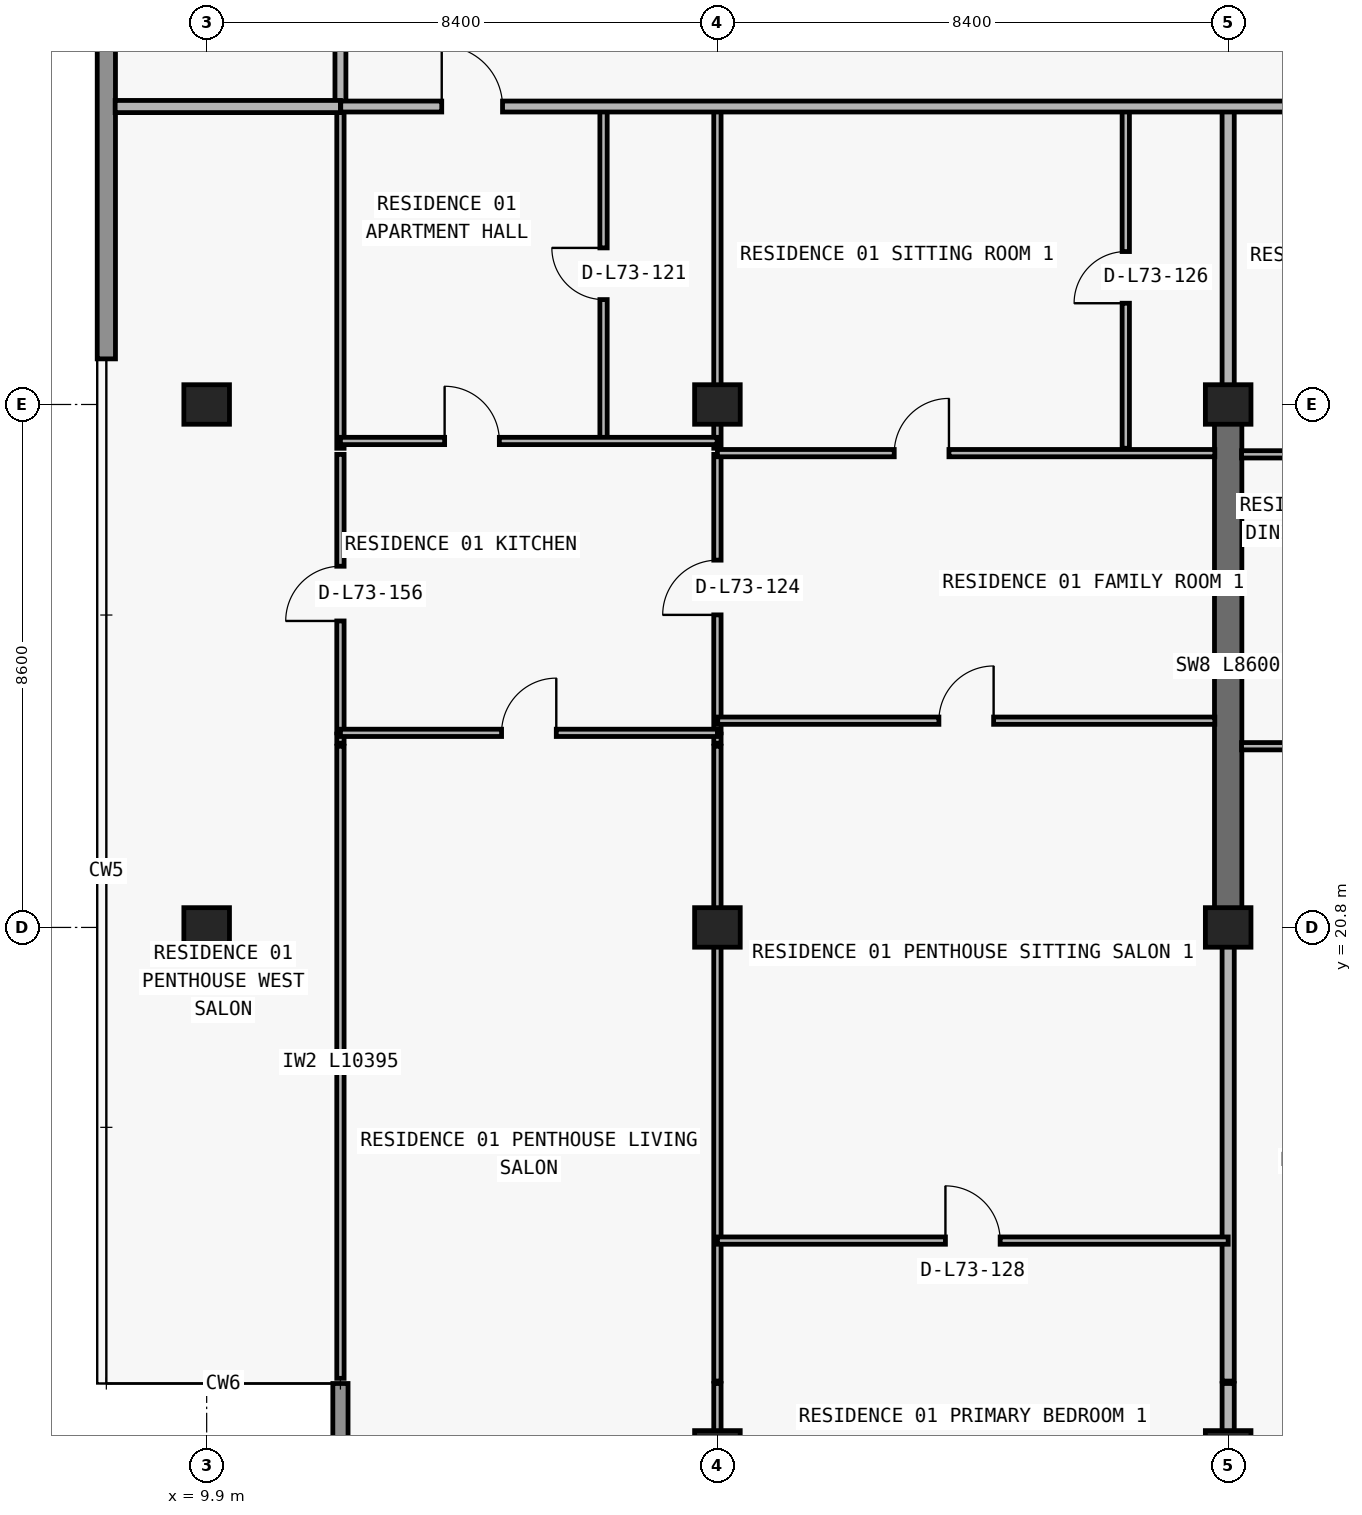
"""IFC4 building model, lengths in metres.
Left out: names, types, materials, properties, quantities, classifications, styles, units other than length and angle.
Written with IfcOpenShell. Run it as: python <this file> out.ifc"""

import sys

from ifc_helpers import new_model, si_unit, direction, frame, frame_2d, origin, origin_2d, place, context, subcontext, project, spatial, rectangle, extrude, element, fill, save


model = new_model("IFC4")
c1 = context("Model", 3, precision=1e-05, world=origin(), true_north=direction((0.0, 1.0)))
c2 = subcontext(c1, "Body", "Model", "MODEL_VIEW")
j1 = project(units=[si_unit("LENGTHUNIT", "METRE"), si_unit("PLANEANGLEUNIT", "RADIAN")], contexts=[c1])
p1 = place(None, origin())
s1 = spatial("IfcSite", under=j1, at=p1, CompositionType="ELEMENT")
p2 = place(p1, origin())
s2 = spatial("IfcBuilding", under=s1, at=p2, CompositionType="ELEMENT")
p3 = place(p2, frame((0.0, 0.0, 259.5)))
s3 = spatial("IfcBuildingStorey", under=s2, at=p3, CompositionType="ELEMENT", Elevation=259.5)
for number, where, z_axis, x_axis in (
    (1, (18.3, 12.2, 0.0), (0.0, 0.0, 1.0), (1.0, 0.0, 0.0)),
    (2, (26.7, 12.2, 0.0), (0.0, 0.0, 1.0), (1.0, 0.0, 0.0)),
    (3, (9.9, 20.8, 0.0), (0.0, 0.0, 1.0), (1.0, 0.0, 0.0)),
    (4, (18.3, 20.8, 0.0), (0.0, 0.0, 1.0), (1.0, 0.0, 0.0)),
    (5, (26.7, 20.8, 0.0), (0.0, 0.0, 1.0), (1.0, 0.0, 0.0)),
    (6, (9.9, 29.4, 0.0), (0.0, 0.0, 1.0), (1.0, 0.0, 0.0)),
    (7, (18.3, 29.4, 0.0), (0.0, 0.0, 1.0), (1.0, 0.0, 0.0)),
    (8, (26.7, 29.4, 0.0), (0.0, 0.0, 1.0), (1.0, 0.0, 0.0)),
):
    element("IfcColumn", number, at=place(p3, frame(where, z_axis=z_axis, x_axis=x_axis)), inside=s3, PredefinedType="COLUMN", context=c2, shape_type="SweptSolid", body=[
        extrude(rectangle(XDim=0.75, YDim=0.65, at=origin_2d()), origin(), (0.0, 0.0, 1.0), 3.05),
    ])
p4 = place(p3, frame((26.7, 20.8, 0.0), z_axis=(0.0, 0.0, 1.0), x_axis=(0.0, 1.0, 0.0)))
e9 = element("IfcWall", 9, at=p4, inside=s3, PredefinedType="SHEAR", context=c2, shape_type="SweptSolid", body=[
    extrude(rectangle(XDim=8.6, YDim=0.45, at=frame_2d((4.3, 0.0))), origin(), (0.0, 0.0, 1.0), 3.05),
])
p5 = place(p3, frame((12.1, 13.3, 0.0), z_axis=(0.0, 0.0, 1.0), x_axis=(0.0, -1.0, 0.0)))
e10 = element("IfcWall", 10, at=p5, inside=s3, PredefinedType="ELEMENTEDWALL", context=c2, shape_type="SweptSolid", body=[
    extrude(rectangle(XDim=3.45, YDim=0.25, at=frame_2d((1.725, 0.0))), origin(), (0.0, 0.0, 1.0), 3.05),
])
p6 = place(p3, frame((8.25, 30.15, 0.0), z_axis=(0.0, 0.0, 1.0), x_axis=(0.0, 1.0, 0.0)))
e11 = element("IfcWall", 11, at=p6, inside=s3, PredefinedType="STANDARD", context=c2, shape_type="SweptSolid", body=[
    extrude(rectangle(XDim=16.85, YDim=0.3, at=frame_2d((8.425, 0.0))), origin(), (0.0, 0.0, 1.0), 3.05),
])
p7 = place(p3, frame((12.1, 13.385, 0.0), z_axis=(0.0, 0.0, 1.0), x_axis=(0.0, 1.0, 0.0)))
e12 = element("IfcWall", 12, at=p7, inside=s3, PredefinedType="PARTITIONING", context=c2, shape_type="SweptSolid", body=[
    extrude(rectangle(XDim=10.395, YDim=0.12, at=frame_2d((5.198, 0.0))), origin(), (0.0, 0.0, 1.0), 2.725),
])
p8 = place(p3, frame((12.1, 23.83, 0.0), z_axis=(0.0, 0.0, 1.0), x_axis=(0.0, 1.0, 0.0)))
e13 = element("IfcWall", 13, at=p8, inside=s3, PredefinedType="PARTITIONING", context=c2, shape_type="SweptSolid", body=[
    extrude(rectangle(XDim=0.15, YDim=0.12, at=frame_2d((0.075, 0.0))), origin(), (0.0, 0.0, 1.0), 2.725),
])
p9 = place(p3, frame((12.1, 24.0, 0.0), z_axis=(0.0, 0.0, 1.0), x_axis=(0.0, 1.0, 0.0)))
e14 = element("IfcWall", 14, at=p9, inside=s3, PredefinedType="PARTITIONING", context=c2, shape_type="SweptSolid", body=[
    extrude(rectangle(XDim=4.58, YDim=0.12, at=frame_2d((2.29, 0.0))), origin(), (0.0, 0.0, 1.0), 2.725),
])
p10 = place(p9, frame((1.84, 0.0, 0.0)))
e15 = element("IfcOpeningElement", 15, at=p10, cuts=e14, PredefinedType="OPENING", context=c2, shape_type="SweptSolid", body=[
    extrude(rectangle(XDim=0.9, YDim=2.15, at=frame_2d((0.45, 1.075))), frame((0.0, 0.07, 0.0), z_axis=(0.0, -1.0, 0.0), x_axis=(1.0, 0.0, 0.0)), (0.0, 0.0, 1.0), 0.14),
])
p11 = place(p3, frame((12.1, 28.68, 0.0), z_axis=(0.0, 0.0, 1.0), x_axis=(0.0, 1.0, 0.0)))
e16 = element("IfcWall", 16, at=p11, inside=s3, PredefinedType="PARTITIONING", context=c2, shape_type="SweptSolid", body=[
    extrude(rectangle(XDim=5.62, YDim=0.12, at=frame_2d((2.81, 0.0))), origin(), (0.0, 0.0, 1.0), 2.725),
])
p12 = place(p3, frame((12.1, 34.305, 0.0), z_axis=(0.0, 0.0, 1.0), x_axis=(0.0, 1.0, 0.0)))
e17 = element("IfcWall", 17, at=p12, inside=s3, PredefinedType="PARTITIONING", context=c2, shape_type="SweptSolid", body=[
    extrude(rectangle(XDim=2.695, YDim=0.18, at=frame_2d((1.348, 0.0))), origin(), (0.0, 0.0, 1.0), 2.725),
])
p13 = place(p3, frame((16.427, 28.8, 0.0), z_axis=(0.0, 0.0, 1.0), x_axis=(0.0, 1.0, 0.0)))
e18 = element("IfcWall", 18, at=p13, inside=s3, PredefinedType="PARTITIONING", context=c2, shape_type="SweptSolid", body=[
    extrude(rectangle(XDim=5.5, YDim=0.12, at=frame_2d((2.75, 0.0))), origin(), (0.0, 0.0, 1.0), 2.629),
])
p14 = place(p13, frame((2.325, 0.0, 0.0)))
e19 = element("IfcOpeningElement", 19, at=p14, cuts=e18, PredefinedType="OPENING", context=c2, shape_type="SweptSolid", body=[
    extrude(rectangle(XDim=0.85, YDim=2.1, at=frame_2d((0.425, 1.05))), frame((0.0, 0.07, 0.0), z_axis=(0.0, -1.0, 0.0), x_axis=(1.0, 0.0, 0.0)), (0.0, 0.0, 1.0), 0.14),
])
p15 = place(p3, frame((18.3, 9.995, 0.0), z_axis=(0.0, 0.0, 1.0), x_axis=(0.0, 1.0, 0.0)))
e20 = element("IfcWall", 20, at=p15, inside=s3, PredefinedType="PARTITIONING", context=c2, shape_type="SweptSolid", body=[
    extrude(rectangle(XDim=3.305, YDim=0.12, at=frame_2d((1.652, 0.0))), origin(), (0.0, 0.0, 1.0), 2.263),
])
p16 = place(p3, frame((18.3, 13.34, 0.0), z_axis=(0.0, 0.0, 1.0), x_axis=(0.0, 1.0, 0.0)))
e21 = element("IfcWall", 21, at=p16, inside=s3, PredefinedType="PARTITIONING", context=c2, shape_type="SweptSolid", body=[
    extrude(rectangle(XDim=10.44, YDim=0.12, at=frame_2d((5.22, 0.0))), origin(), (0.0, 0.0, 1.0), 2.263),
])
p17 = place(p3, frame((18.3, 23.83, 0.0), z_axis=(0.0, 0.0, 1.0), x_axis=(0.0, 1.0, 0.0)))
e22 = element("IfcWall", 22, at=p17, inside=s3, PredefinedType="PARTITIONING", context=c2, shape_type="SweptSolid", body=[
    extrude(rectangle(XDim=0.15, YDim=0.12, at=frame_2d((0.075, 0.0))), origin(), (0.0, 0.0, 1.0), 2.263),
])
p18 = place(p3, frame((18.3, 24.0, 0.0), z_axis=(0.0, 0.0, 1.0), x_axis=(0.0, 1.0, 0.0)))
e23 = element("IfcWall", 23, at=p18, inside=s3, PredefinedType="PARTITIONING", context=c2, shape_type="SweptSolid", body=[
    extrude(rectangle(XDim=4.58, YDim=0.12, at=frame_2d((2.29, 0.0))), origin(), (0.0, 0.0, 1.0), 2.263),
])
p19 = place(p18, frame((1.94, 0.0, 0.0)))
e24 = element("IfcOpeningElement", 24, at=p19, cuts=e23, PredefinedType="OPENING", context=c2, shape_type="SweptSolid", body=[
    extrude(rectangle(XDim=0.9, YDim=2.15, at=frame_2d((0.45, 1.075))), frame((0.0, 0.07, 0.0), z_axis=(0.0, -1.0, 0.0), x_axis=(1.0, 0.0, 0.0)), (0.0, 0.0, 1.0), 0.14),
])
p20 = place(p3, frame((18.3, 28.68, 0.0), z_axis=(0.0, 0.0, 1.0), x_axis=(0.0, 1.0, 0.0)))
e25 = element("IfcWall", 25, at=p20, inside=s3, PredefinedType="PARTITIONING", context=c2, shape_type="SweptSolid", body=[
    extrude(rectangle(XDim=5.62, YDim=0.12, at=frame_2d((2.81, 0.0))), origin(), (0.0, 0.0, 1.0), 2.263),
])
p21 = place(p3, frame((25.016, 28.68, 0.0), z_axis=(0.0, 0.0, 1.0), x_axis=(0.0, 1.0, 0.0)))
e26 = element("IfcWall", 26, at=p21, inside=s3, PredefinedType="PARTITIONING", context=c2, shape_type="SweptSolid", body=[
    extrude(rectangle(XDim=5.62, YDim=0.12, at=frame_2d((2.81, 0.0))), origin(), (0.0, 0.0, 1.0), 3.05),
])
p22 = place(p21, frame((2.385, 0.0, 0.0)))
e27 = element("IfcOpeningElement", 27, at=p22, cuts=e26, PredefinedType="OPENING", context=c2, shape_type="SweptSolid", body=[
    extrude(rectangle(XDim=0.85, YDim=2.1, at=frame_2d((0.425, 1.05))), frame((0.0, 0.07, 0.0), z_axis=(0.0, -1.0, 0.0), x_axis=(1.0, 0.0, 0.0)), (0.0, 0.0, 1.0), 0.14),
])
p23 = place(p3, frame((26.7, 9.995, 0.0), z_axis=(0.0, 0.0, 1.0), x_axis=(0.0, 1.0, 0.0)))
e28 = element("IfcWall", 28, at=p23, inside=s3, PredefinedType="PARTITIONING", context=c2, shape_type="SweptSolid", body=[
    extrude(rectangle(XDim=3.305, YDim=0.2, at=frame_2d((1.652, 0.0))), origin(), (0.0, 0.0, 1.0), 2.263),
])
p24 = place(p3, frame((26.7, 13.34, 0.0), z_axis=(0.0, 0.0, 1.0), x_axis=(0.0, 1.0, 0.0)))
e29 = element("IfcWall", 29, at=p24, inside=s3, PredefinedType="PARTITIONING", context=c2, shape_type="SweptSolid", body=[
    extrude(rectangle(XDim=7.455, YDim=0.2, at=frame_2d((3.728, 0.0))), origin(), (0.0, 0.0, 1.0), 2.263),
])
p25 = place(p3, frame((26.7, 29.405, 0.0), z_axis=(0.0, 0.0, 1.0), x_axis=(0.0, 1.0, 0.0)))
e30 = element("IfcWall", 30, at=p25, inside=s3, PredefinedType="PARTITIONING", context=c2, shape_type="SweptSolid", body=[
    extrude(rectangle(XDim=4.895, YDim=0.2, at=frame_2d((2.448, 0.0))), origin(), (0.0, 0.0, 1.0), 2.335),
])
p26 = place(p3, frame((18.3, 15.65, 0.0), z_axis=(0.0, 0.0, 1.0), x_axis=(1.0, 0.0, 0.0)))
e31 = element("IfcWall", 31, at=p26, inside=s3, PredefinedType="PARTITIONING", context=c2, shape_type="SweptSolid", body=[
    extrude(rectangle(XDim=8.4, YDim=0.12, at=frame_2d((4.2, 0.0))), origin(), (0.0, 0.0, 1.0), 3.05),
])
p27 = place(p26, frame((3.75, 0.0, 0.0)))
e32 = element("IfcOpeningElement", 32, at=p27, cuts=e31, PredefinedType="OPENING", context=c2, shape_type="SweptSolid", body=[
    extrude(rectangle(XDim=0.9, YDim=2.15, at=frame_2d((0.45, 1.075))), frame((0.0, 0.07, 0.0), z_axis=(0.0, -1.0, 0.0), x_axis=(1.0, 0.0, 0.0)), (0.0, 0.0, 1.0), 0.14),
])
p28 = place(p3, frame((26.92, 23.78, 0.0), z_axis=(0.0, 0.0, 1.0), x_axis=(1.0, 0.0, 0.0)))
e33 = element("IfcWall", 33, at=p28, inside=s3, PredefinedType="PARTITIONING", context=c2, shape_type="SweptSolid", body=[
    extrude(rectangle(XDim=8.18, YDim=0.12, at=frame_2d((4.09, 0.0))), origin(), (0.0, 0.0, 1.0), 3.05),
])
p29 = place(p28, frame((1.204, 0.0, 0.0)))
e34 = element("IfcOpeningElement", 34, at=p29, cuts=e33, PredefinedType="OPENING", context=c2, shape_type="SweptSolid", body=[
    extrude(rectangle(XDim=0.9, YDim=2.15, at=frame_2d((0.45, 1.075))), frame((0.0, 0.07, 0.0), z_axis=(0.0, -1.0, 0.0), x_axis=(1.0, 0.0, 0.0)), (0.0, 0.0, 1.0), 0.14),
])
p30 = place(p3, frame((12.1, 24.0, 0.0), z_axis=(0.0, 0.0, 1.0), x_axis=(1.0, 0.0, 0.0)))
e35 = element("IfcWall", 35, at=p30, inside=s3, PredefinedType="PARTITIONING", context=c2, shape_type="SweptSolid", body=[
    extrude(rectangle(XDim=6.2, YDim=0.12, at=frame_2d((3.1, 0.0))), origin(), (0.0, 0.0, 1.0), 3.05),
])
p31 = place(p30, frame((2.65, 0.0, 0.0)))
e36 = element("IfcOpeningElement", 36, at=p31, cuts=e35, PredefinedType="OPENING", context=c2, shape_type="SweptSolid", body=[
    extrude(rectangle(XDim=0.9, YDim=2.15, at=frame_2d((0.45, 1.075))), frame((0.0, 0.07, 0.0), z_axis=(0.0, -1.0, 0.0), x_axis=(1.0, 0.0, 0.0)), (0.0, 0.0, 1.0), 0.14),
])
p32 = place(p3, frame((18.305, 24.2, 0.0), z_axis=(0.0, 0.0, 1.0), x_axis=(1.0, 0.0, 0.0)))
e37 = element("IfcWall", 37, at=p32, inside=s3, PredefinedType="PARTITIONING", context=c2, shape_type="SweptSolid", body=[
    extrude(rectangle(XDim=8.175, YDim=0.12, at=frame_2d((4.087, 0.0))), origin(), (0.0, 0.0, 1.0), 3.05),
])
p33 = place(p32, frame((3.637, 0.0, 0.0)))
e38 = element("IfcOpeningElement", 38, at=p33, cuts=e37, PredefinedType="OPENING", context=c2, shape_type="SweptSolid", body=[
    extrude(rectangle(XDim=0.9, YDim=2.15, at=frame_2d((0.45, 1.075))), frame((0.0, 0.07, 0.0), z_axis=(0.0, -1.0, 0.0), x_axis=(1.0, 0.0, 0.0)), (0.0, 0.0, 1.0), 0.14),
])
p34 = place(p3, frame((26.92, 28.58, 0.0), z_axis=(0.0, 0.0, 1.0), x_axis=(1.0, 0.0, 0.0)))
e39 = element("IfcWall", 39, at=p34, inside=s3, PredefinedType="PARTITIONING", context=c2, shape_type="SweptSolid", body=[
    extrude(rectangle(XDim=8.175, YDim=0.12, at=frame_2d((4.087, 0.0))), origin(), (0.0, 0.0, 1.0), 3.05),
])
p35 = place(p34, frame((1.204, 0.0, 0.0)))
e40 = element("IfcOpeningElement", 40, at=p35, cuts=e39, PredefinedType="OPENING", context=c2, shape_type="SweptSolid", body=[
    extrude(rectangle(XDim=0.9, YDim=2.15, at=frame_2d((0.45, 1.075))), frame((0.0, 0.07, 0.0), z_axis=(0.0, -1.0, 0.0), x_axis=(1.0, 0.0, 0.0)), (0.0, 0.0, 1.0), 0.14),
])
p36 = place(p3, frame((18.3, 28.6, 0.0), z_axis=(0.0, 0.0, 1.0), x_axis=(1.0, 0.0, 0.0)))
e41 = element("IfcWall", 41, at=p36, inside=s3, PredefinedType="PARTITIONING", context=c2, shape_type="SweptSolid", body=[
    extrude(rectangle(XDim=8.18, YDim=0.12, at=frame_2d((4.09, 0.0))), origin(), (0.0, 0.0, 1.0), 3.05),
])
p37 = place(p36, frame((2.908, 0.0, 0.0)))
e42 = element("IfcOpeningElement", 42, at=p37, cuts=e41, PredefinedType="OPENING", context=c2, shape_type="SweptSolid", body=[
    extrude(rectangle(XDim=0.9, YDim=2.15, at=frame_2d((0.45, 1.075))), frame((0.0, 0.07, 0.0), z_axis=(0.0, -1.0, 0.0), x_axis=(1.0, 0.0, 0.0)), (0.0, 0.0, 1.0), 0.14),
])
p38 = place(p3, frame((12.1, 28.8, 0.0), z_axis=(0.0, 0.0, 1.0), x_axis=(1.0, 0.0, 0.0)))
e43 = element("IfcWall", 43, at=p38, inside=s3, PredefinedType="PARTITIONING", context=c2, shape_type="SweptSolid", body=[
    extrude(rectangle(XDim=6.195, YDim=0.12, at=frame_2d((3.097, 0.0))), origin(), (0.0, 0.0, 1.0), 3.05),
])
p39 = place(p38, frame((1.713, 0.0, 0.0)))
e44 = element("IfcOpeningElement", 44, at=p39, cuts=e43, PredefinedType="OPENING", context=c2, shape_type="SweptSolid", body=[
    extrude(rectangle(XDim=0.9, YDim=2.15, at=frame_2d((0.45, 1.075))), frame((0.0, 0.07, 0.0), z_axis=(0.0, -1.0, 0.0), x_axis=(1.0, 0.0, 0.0)), (0.0, 0.0, 1.0), 0.14),
])
p40 = place(p3, frame((8.395, 34.3, 0.0), z_axis=(0.0, 0.0, 1.0), x_axis=(1.0, 0.0, 0.0)))
e45 = element("IfcWall", 45, at=p40, inside=s3, PredefinedType="PARTITIONING", context=c2, shape_type="SweptSolid", body=[
    extrude(rectangle(XDim=3.705, YDim=0.2, at=frame_2d((1.853, 0.0))), origin(), (0.0, 0.0, 1.0), 3.05),
])
p41 = place(p3, frame((12.105, 34.3, 0.0), z_axis=(0.0, 0.0, 1.0), x_axis=(1.0, 0.0, 0.0)))
e46 = element("IfcWall", 46, at=p41, inside=s3, PredefinedType="PARTITIONING", context=c2, shape_type="SweptSolid", body=[
    extrude(rectangle(XDim=53.595, YDim=0.18, at=frame_2d((26.797, 0.0))), origin(), (0.0, 0.0, 1.0), 3.05),
])
p42 = place(p41, frame((1.661, 0.0, 0.0)))
e47 = element("IfcOpeningElement", 47, at=p42, cuts=e46, PredefinedType="OPENING", context=c2, shape_type="SweptSolid", body=[
    extrude(rectangle(XDim=1.0, YDim=2.2, at=frame_2d((0.5, 1.1))), frame((0.0, 0.1, 0.0), z_axis=(0.0, -1.0, 0.0), x_axis=(1.0, 0.0, 0.0)), (0.0, 0.0, 1.0), 0.2),
])
p43 = place(p41, frame((17.438, 0.0, 0.0)))
e48 = element("IfcOpeningElement", 48, at=p43, cuts=e46, PredefinedType="OPENING", context=c2, shape_type="SweptSolid", body=[
    extrude(rectangle(XDim=1.0, YDim=2.2, at=frame_2d((0.5, 1.1))), frame((0.0, 0.1, 0.0), z_axis=(0.0, -1.0, 0.0), x_axis=(1.0, 0.0, 0.0)), (0.0, 0.0, 1.0), 0.2),
])
p44 = place(p41, frame((41.727, 0.0, 0.0)))
e49 = element("IfcOpeningElement", 49, at=p44, cuts=e46, PredefinedType="OPENING", context=c2, shape_type="SweptSolid", body=[
    extrude(rectangle(XDim=1.0, YDim=2.2, at=frame_2d((0.5, 1.1))), frame((0.0, 0.1, 0.0), z_axis=(0.0, -1.0, 0.0), x_axis=(1.0, 0.0, 0.0)), (0.0, 0.0, 1.0), 0.2),
])
p45 = place(p41, frame((49.141, 0.0, 0.0)))
e50 = element("IfcOpeningElement", 50, at=p45, cuts=e46, PredefinedType="OPENING", context=c2, shape_type="SweptSolid", body=[
    extrude(rectangle(XDim=1.0, YDim=2.2, at=frame_2d((0.5, 1.1))), frame((0.0, 0.1, 0.0), z_axis=(0.0, -1.0, 0.0), x_axis=(1.0, 0.0, 0.0)), (0.0, 0.0, 1.0), 0.2),
])
p46 = place(p42, origin())
e51 = element("IfcDoor", 51, at=p46, inside=s3, OperationType="SINGLE_SWING_LEFT", PredefinedType="DOOR", context=c2, shape_type="SweptSolid", body=[
    extrude(rectangle(XDim=1.0, YDim=2.2, at=frame_2d((0.5, 1.1))), frame((0.0, 0.025, 0.0), z_axis=(0.0, -1.0, 0.0), x_axis=(1.0, 0.0, 0.0)), (0.0, 0.0, 1.0), 0.05),
])
fill(e47, e51)
p47 = place(p14, origin())
e52 = element("IfcDoor", 52, at=p47, inside=s3, OperationType="SINGLE_SWING_RIGHT", PredefinedType="DOOR", context=c2, shape_type="SweptSolid", body=[
    extrude(rectangle(XDim=0.85, YDim=2.1, at=frame_2d((0.425, 1.05))), frame((0.0, 0.025, 0.0), z_axis=(0.0, -1.0, 0.0), x_axis=(1.0, 0.0, 0.0)), (0.0, 0.0, 1.0), 0.05),
])
fill(e19, e52)
p48 = place(p39, origin())
e53 = element("IfcDoor", 53, at=p48, inside=s3, OperationType="SINGLE_SWING_LEFT", PredefinedType="DOOR", context=c2, shape_type="SweptSolid", body=[
    extrude(rectangle(XDim=0.9, YDim=2.15, at=frame_2d((0.45, 1.075))), frame((0.0, 0.025, 0.0), z_axis=(0.0, -1.0, 0.0), x_axis=(1.0, 0.0, 0.0)), (0.0, 0.0, 1.0), 0.05),
])
fill(e44, e53)
p49 = place(p31, origin())
e54 = element("IfcDoor", 54, at=p49, inside=s3, OperationType="SINGLE_SWING_RIGHT", PredefinedType="DOOR", context=c2, shape_type="SweptSolid", body=[
    extrude(rectangle(XDim=0.9, YDim=2.15, at=frame_2d((0.45, 1.075))), frame((0.0, 0.025, 0.0), z_axis=(0.0, -1.0, 0.0), x_axis=(1.0, 0.0, 0.0)), (0.0, 0.0, 1.0), 0.05),
])
fill(e36, e54)
p50 = place(p19, origin())
e55 = element("IfcDoor", 55, at=p50, inside=s3, OperationType="SINGLE_SWING_LEFT", PredefinedType="DOOR", context=c2, shape_type="SweptSolid", body=[
    extrude(rectangle(XDim=0.9, YDim=2.15, at=frame_2d((0.45, 1.075))), frame((0.0, 0.025, 0.0), z_axis=(0.0, -1.0, 0.0), x_axis=(1.0, 0.0, 0.0)), (0.0, 0.0, 1.0), 0.05),
])
fill(e24, e55)
p51 = place(p37, origin())
e56 = element("IfcDoor", 56, at=p51, inside=s3, OperationType="SINGLE_SWING_RIGHT", PredefinedType="DOOR", context=c2, shape_type="SweptSolid", body=[
    extrude(rectangle(XDim=0.9, YDim=2.15, at=frame_2d((0.45, 1.075))), frame((0.0, 0.025, 0.0), z_axis=(0.0, -1.0, 0.0), x_axis=(1.0, 0.0, 0.0)), (0.0, 0.0, 1.0), 0.05),
])
fill(e42, e56)
p52 = place(p22, origin())
e57 = element("IfcDoor", 57, at=p52, inside=s3, OperationType="SINGLE_SWING_LEFT", PredefinedType="DOOR", context=c2, shape_type="SweptSolid", body=[
    extrude(rectangle(XDim=0.85, YDim=2.1, at=frame_2d((0.425, 1.05))), frame((0.0, 0.025, 0.0), z_axis=(0.0, -1.0, 0.0), x_axis=(1.0, 0.0, 0.0)), (0.0, 0.0, 1.0), 0.05),
])
fill(e27, e57)
p53 = place(p33, origin())
e58 = element("IfcDoor", 58, at=p53, inside=s3, OperationType="SINGLE_SWING_RIGHT", PredefinedType="DOOR", context=c2, shape_type="SweptSolid", body=[
    extrude(rectangle(XDim=0.9, YDim=2.15, at=frame_2d((0.45, 1.075))), frame((0.0, 0.025, 0.0), z_axis=(0.0, -1.0, 0.0), x_axis=(1.0, 0.0, 0.0)), (0.0, 0.0, 1.0), 0.05),
])
fill(e38, e58)
p54 = place(p27, origin())
e59 = element("IfcDoor", 59, at=p54, inside=s3, OperationType="SINGLE_SWING_LEFT", PredefinedType="DOOR", context=c2, shape_type="SweptSolid", body=[
    extrude(rectangle(XDim=0.9, YDim=2.15, at=frame_2d((0.45, 1.075))), frame((0.0, 0.025, 0.0), z_axis=(0.0, -1.0, 0.0), x_axis=(1.0, 0.0, 0.0)), (0.0, 0.0, 1.0), 0.05),
])
fill(e32, e59)
p55 = place(p10, origin())
e60 = element("IfcDoor", 60, at=p55, inside=s3, OperationType="SINGLE_SWING_LEFT", PredefinedType="DOOR", context=c2, shape_type="SweptSolid", body=[
    extrude(rectangle(XDim=0.9, YDim=2.15, at=frame_2d((0.45, 1.075))), frame((0.0, 0.025, 0.0), z_axis=(0.0, -1.0, 0.0), x_axis=(1.0, 0.0, 0.0)), (0.0, 0.0, 1.0), 0.05),
])
fill(e15, e60)
save(model, sys.argv[1])
